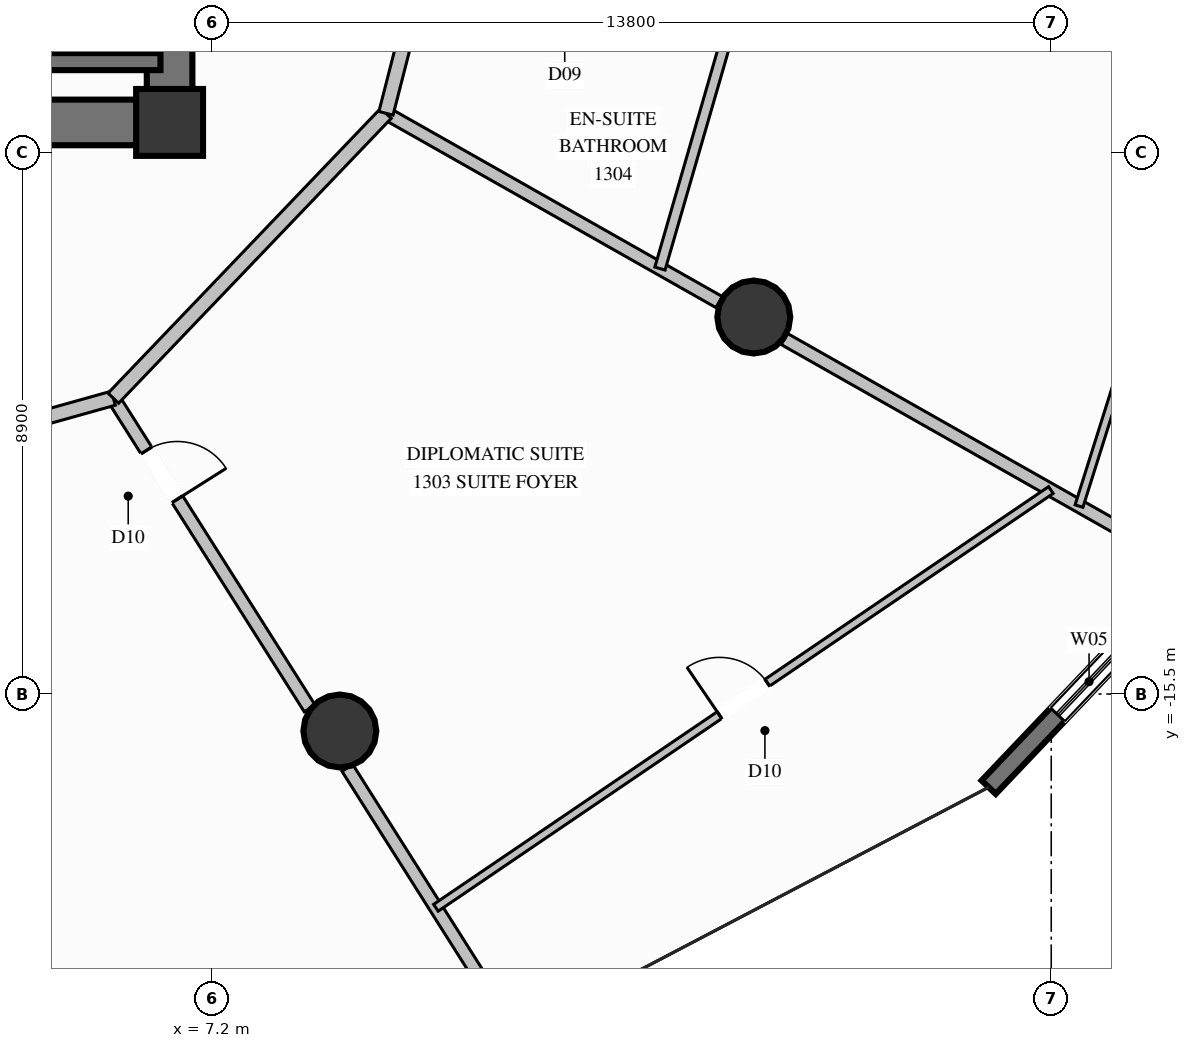
"""IFC4 building model, lengths in metres.
Left out: names, types, materials, properties, quantities, classifications, styles, units other than length and angle.
Written with IfcOpenShell. Run it as: python <this file> out.ifc"""

import sys

from ifc_helpers import new_model, si_unit, direction, frame, frame_2d, origin, origin_2d, place, context, subcontext, project, spatial, rectangle, circle, extrude, element, fill, save


model = new_model("IFC4")
c1 = context("Model", 3, precision=1e-05, world=origin(), true_north=direction((0.0, 1.0)))
c2 = subcontext(c1, "Body", "Model", "MODEL_VIEW")
j1 = project(units=[si_unit("LENGTHUNIT", "METRE"), si_unit("PLANEANGLEUNIT", "RADIAN")], contexts=[c1])
p1 = place(None, origin())
s1 = spatial("IfcSite", under=j1, at=p1, CompositionType="ELEMENT")
p2 = place(p1, origin())
s2 = spatial("IfcBuilding", under=s1, at=p2, CompositionType="ELEMENT")
p3 = place(p2, frame((0.0, 0.0, 50.0)))
s3 = spatial("IfcBuildingStorey", under=s2, at=p3, CompositionType="ELEMENT", Elevation=50.0)
p4 = place(p3, frame((6.5, -6.1, 0.0), z_axis=(0.0, 0.0, 1.0), x_axis=(1.0, 0.0, 0.0)))
e1 = element("IfcColumn", 1, at=p4, inside=s3, PredefinedType="COLUMN", context=c2, shape_type="SweptSolid", body=[
    extrude(rectangle(XDim=1.1, YDim=1.1, at=origin_2d()), origin(), (0.0, 0.0, 1.0), 3.6),
])
p5 = place(p3, frame((4.15, -6.1, 0.0), z_axis=(0.0, 0.0, 1.0), x_axis=(1.0, 0.0, 0.0)))
e2 = element("IfcWall", 2, at=p5, inside=s3, PredefinedType="SHEAR", context=c2, shape_type="SweptSolid", body=[
    extrude(rectangle(XDim=1.975, YDim=0.75, at=frame_2d((0.988, 0.0))), origin(), (0.0, 0.0, 1.0), 3.6),
])
p6 = place(p3, frame((6.5, -6.475, 0.0), z_axis=(0.0, 0.0, 1.0), x_axis=(0.0, 1.0, 0.0)))
e3 = element("IfcWall", 3, at=p6, inside=s3, PredefinedType="SHEAR", context=c2, shape_type="SweptSolid", body=[
    extrude(rectangle(XDim=4.125, YDim=0.75, at=frame_2d((2.062, 0.0))), origin(), (0.0, 0.0, 1.0), 3.6),
])
for number, where, z_axis, x_axis in (
    (4, (9.3, -16.108, 0.0), (0.0, 0.0, 1.0), (1.0, 0.0, 0.0)),
    (5, (16.108, -9.3, 0.0), (0.0, 0.0, 1.0), (1.0, 0.0, 0.0)),
):
    element("IfcColumn", number, at=place(p3, frame(where, z_axis=z_axis, x_axis=x_axis)), inside=s3, PredefinedType="COLUMN", context=c2, shape_type="SweptSolid", body=[
        extrude(circle(Radius=0.6, at=origin_2d()), origin(), (0.0, 0.0, 1.0), 3.6),
    ])
p7 = place(p3, frame((24.954, -11.79, 0.0), z_axis=(0.0, 0.0, 1.0), x_axis=(-0.688922418365, -0.724835085708, 0.0)))
e6 = element("IfcWall", 6, at=p7, inside=s3, PredefinedType="SOLIDWALL", context=c2, shape_type="SweptSolid", body=[
    extrude(rectangle(XDim=7.233, YDim=0.32, at=frame_2d((3.617, 0.0))), origin(), (0.0, 0.0, 1.0), 3.34),
])
p8 = place(p7, frame((4.087, 0.0, 0.85)))
e7 = element("IfcOpeningElement", 7, at=p8, cuts=e6, PredefinedType="OPENING", context=c2, shape_type="SweptSolid", body=[
    extrude(rectangle(XDim=1.5, YDim=1.2, at=frame_2d((0.75, 0.6))), frame((0.0, 0.17, 0.0), z_axis=(0.0, -1.0, 0.0), x_axis=(1.0, 0.0, 0.0)), (0.0, 0.0, 1.0), 0.34),
])
p9 = place(p3, frame((4.15, -5.1, 0.0), z_axis=(0.0, 0.0, 1.0), x_axis=(1.0, 0.0, 0.0)))
e8 = element("IfcWall", 8, at=p9, inside=s3, PredefinedType="SOLIDWALL", context=c2, shape_type="SweptSolid", body=[
    extrude(rectangle(XDim=2.2, YDim=0.28, at=frame_2d((1.1, 0.0))), origin(), (0.0, 0.0, 1.0), 3.34),
])
p10 = place(p3, frame((5.575, -10.635, 0.0), z_axis=(0.0, 0.0, 1.0), x_axis=(0.534853877246, -0.844944572144, 0.0)))
e9 = element("IfcWall", 9, at=p10, inside=s3, PredefinedType="PARTITIONING", context=c2, shape_type="SweptSolid", body=[
    extrude(rectangle(XDim=6.037, YDim=0.21, at=frame_2d((3.019, 0.0))), origin(), (0.0, 0.0, 1.0), 2.708),
])
p11 = place(p10, frame((1.017, 0.0, 0.0)))
e10 = element("IfcOpeningElement", 10, at=p11, cuts=e9, PredefinedType="OPENING", context=c2, shape_type="SweptSolid", body=[
    extrude(rectangle(XDim=0.95, YDim=2.1, at=frame_2d((0.475, 1.05))), frame((0.0, 0.115, 0.0), z_axis=(0.0, -1.0, 0.0), x_axis=(1.0, 0.0, 0.0)), (0.0, 0.0, 1.0), 0.23),
])
p12 = place(p3, frame((9.424, -16.715, 0.0), z_axis=(0.0, 0.0, 1.0), x_axis=(0.534778847244, -0.844992061821, 0.0)))
e11 = element("IfcWall", 11, at=p12, inside=s3, PredefinedType="PARTITIONING", context=c2, shape_type="SweptSolid", body=[
    extrude(rectangle(XDim=4.826, YDim=0.21, at=frame_2d((2.413, 0.0))), origin(), (0.0, 0.0, 1.0), 3.34),
])
p13 = place(p3, frame((10.059, -5.95, 0.0), z_axis=(0.0, 0.0, 1.0), x_axis=(0.870045461468, -0.492971495097, 0.0)))
e12 = element("IfcWall", 12, at=p13, inside=s3, PredefinedType="PARTITIONING", context=c2, shape_type="SweptSolid", body=[
    extrude(rectangle(XDim=6.299, YDim=0.21, at=frame_2d((3.149, 0.0))), origin(), (0.0, 0.0, 1.0), 2.708),
])
p14 = place(p3, frame((16.611, -9.662, 0.0), z_axis=(0.0, 0.0, 1.0), x_axis=(0.870016294914, -0.493022967603, 0.0)))
e13 = element("IfcWall", 13, at=p14, inside=s3, PredefinedType="PARTITIONING", context=c2, shape_type="SweptSolid", body=[
    extrude(rectangle(XDim=7.703, YDim=0.21, at=frame_2d((3.852, 0.0))), origin(), (0.0, 0.0, 1.0), 3.34),
])
p15 = place(p3, frame((-0.55, -12.35, 0.0), z_axis=(0.0, 0.0, 1.0), x_axis=(0.962960431872, 0.269642738915, 0.0)))
e14 = element("IfcWall", 14, at=p15, inside=s3, PredefinedType="PARTITIONING", context=c2, shape_type="SweptSolid", body=[
    extrude(rectangle(XDim=6.361, YDim=0.24, at=frame_2d((3.18, 0.0))), origin(), (0.0, 0.0, 1.0), 2.919),
])
p16 = place(p3, frame((5.575, -10.635, 0.0), z_axis=(0.0, 0.0, 1.0), x_axis=(0.691445702336, 0.722428432941, 0.0)))
e15 = element("IfcWall", 15, at=p16, inside=s3, PredefinedType="PARTITIONING", context=c2, shape_type="SweptSolid", body=[
    extrude(rectangle(XDim=6.485, YDim=0.24, at=frame_2d((3.243, 0.0))), origin(), (0.0, 0.0, 1.0), 3.34),
])
p17 = place(p3, frame((10.88, -19.015, 0.0), z_axis=(0.0, 0.0, 1.0), x_axis=(0.827254691241, 0.561827087119, 0.0)))
e16 = element("IfcWall", 16, at=p17, inside=s3, PredefinedType="PARTITIONING", context=c2, shape_type="SweptSolid", body=[
    extrude(rectangle(XDim=12.226, YDim=0.135, at=frame_2d((6.113, 0.0))), origin(), (0.0, 0.0, 1.0), 3.34),
])
p18 = place(p17, frame((5.638, 0.0, 0.0)))
e17 = element("IfcOpeningElement", 17, at=p18, cuts=e16, PredefinedType="OPENING", context=c2, shape_type="SweptSolid", body=[
    extrude(rectangle(XDim=0.95, YDim=2.1, at=frame_2d((0.475, 1.05))), frame((0.0, 0.078, 0.0), z_axis=(0.0, -1.0, 0.0), x_axis=(1.0, 0.0, 0.0)), (0.0, 0.0, 1.0), 0.155),
])
p19 = place(p3, frame((10.059, -5.95, 0.0), z_axis=(0.0, 0.0, 1.0), x_axis=(0.248286444079, 0.968686658154, 0.0)))
e18 = element("IfcWall", 18, at=p19, inside=s3, PredefinedType="PARTITIONING", context=c2, shape_type="SweptSolid", body=[
    extrude(rectangle(XDim=2.775, YDim=0.24, at=frame_2d((1.387, 0.0))), origin(), (0.0, 0.0, 1.0), 3.34),
])
p20 = place(p3, frame((14.565, -8.503, 0.0), z_axis=(0.0, 0.0, 1.0), x_axis=(0.277862399165, 0.960620886266, 0.0)))
e19 = element("IfcWall", 19, at=p20, inside=s3, PredefinedType="PLUMBINGWALL", context=c2, shape_type="SweptSolid", body=[
    extrude(rectangle(XDim=3.848, YDim=0.175, at=frame_2d((1.924, 0.0))), origin(), (0.0, 0.0, 1.0), 3.34),
])
p21 = place(p3, frame((21.457, -12.409, 0.0), z_axis=(0.0, 0.0, 1.0), x_axis=(0.300535318397, 0.953770686484, 0.0)))
e20 = element("IfcWall", 20, at=p21, inside=s3, PredefinedType="PARTITIONING", context=c2, shape_type="SweptSolid", body=[
    extrude(rectangle(XDim=13.076, YDim=0.135, at=frame_2d((6.538, 0.0))), origin(), (0.0, 0.0, 1.0), 2.807),
])
p22 = place(p21, frame((6.063, 0.0, 0.0)))
e21 = element("IfcOpeningElement", 21, at=p22, cuts=e20, PredefinedType="OPENING", context=c2, shape_type="SweptSolid", body=[
    extrude(rectangle(XDim=0.95, YDim=2.1, at=frame_2d((0.475, 1.05))), frame((0.0, 0.078, 0.0), z_axis=(0.0, -1.0, 0.0), x_axis=(1.0, 0.0, 0.0)), (0.0, 0.0, 1.0), 0.155),
])
p23 = place(p8, origin())
e22 = element("IfcWindow", 22, at=p23, inside=s3, PartitioningType="SINGLE_PANEL", PredefinedType="WINDOW", context=c2, shape_type="SweptSolid", body=[
    extrude(rectangle(XDim=1.5, YDim=1.2, at=frame_2d((0.75, 0.6))), frame((0.0, 0.03, 0.0), z_axis=(0.0, -1.0, 0.0), x_axis=(1.0, 0.0, 0.0)), (0.0, 0.0, 1.0), 0.06),
])
fill(e7, e22)
p24 = place(p11, origin())
e23 = element("IfcDoor", 23, at=p24, inside=s3, OperationType="SINGLE_SWING_RIGHT", PredefinedType="DOOR", context=c2, shape_type="SweptSolid", body=[
    extrude(rectangle(XDim=0.95, YDim=2.1, at=frame_2d((0.475, 1.05))), frame((0.0, 0.025, 0.0), z_axis=(0.0, -1.0, 0.0), x_axis=(1.0, 0.0, 0.0)), (0.0, 0.0, 1.0), 0.05),
])
fill(e10, e23)
p25 = place(p18, origin())
e24 = element("IfcDoor", 24, at=p25, inside=s3, OperationType="SINGLE_SWING_LEFT", PredefinedType="DOOR", context=c2, shape_type="SweptSolid", body=[
    extrude(rectangle(XDim=0.95, YDim=2.1, at=frame_2d((0.475, 1.05))), frame((0.0, 0.025, 0.0), z_axis=(0.0, -1.0, 0.0), x_axis=(1.0, 0.0, 0.0)), (0.0, 0.0, 1.0), 0.05),
])
fill(e17, e24)
save(model, sys.argv[1])
